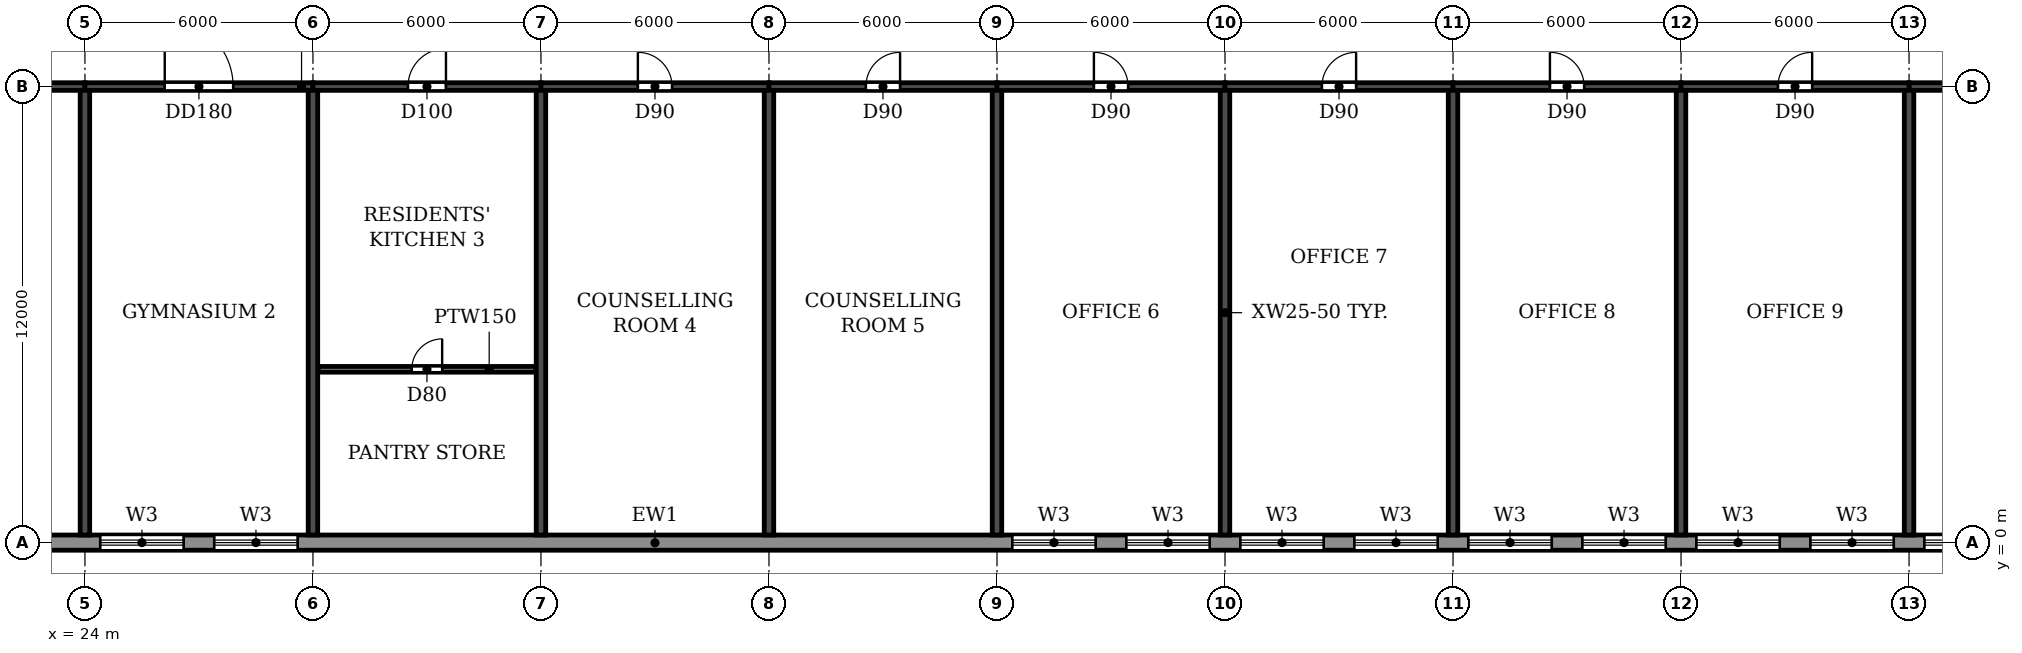
"""IFC4 building model, lengths in metres.
Left out: names, types, materials, properties, quantities, classifications, styles, units other than length and angle.
Written with IfcOpenShell. Run it as: python <this file> out.ifc"""

import sys

from ifc_helpers import new_model, si_unit, direction, frame, frame_2d, origin, place, context, subcontext, project, spatial, rectangle, extrude, element, fill, save


model = new_model("IFC4")
c1 = context("Model", 3, precision=1e-05, world=origin(), true_north=direction((0.0, 1.0)))
c2 = subcontext(c1, "Body", "Model", "MODEL_VIEW")
j1 = project(units=[si_unit("LENGTHUNIT", "METRE"), si_unit("PLANEANGLEUNIT", "RADIAN")], contexts=[c1])
p1 = place(None, origin())
s1 = spatial("IfcSite", under=j1, at=p1, CompositionType="ELEMENT")
p2 = place(p1, origin())
s2 = spatial("IfcBuilding", under=s1, at=p2, CompositionType="ELEMENT")
p3 = place(p2, frame((0.0, 0.0, 261.0)))
s3 = spatial("IfcBuildingStorey", under=s2, at=p3, CompositionType="ELEMENT", Elevation=261.0)
for number, where, z_axis, x_axis in (
    (1, (24.0, 0.2, 0.0), (0.0, 0.0, 1.0), (0.0, 1.0, 0.0)),
    (2, (30.0, 0.2, 0.0), (0.0, 0.0, 1.0), (0.0, 1.0, 0.0)),
    (3, (36.0, 0.2, 0.0), (0.0, 0.0, 1.0), (0.0, 1.0, 0.0)),
    (4, (42.0, 0.2, 0.0), (0.0, 0.0, 1.0), (0.0, 1.0, 0.0)),
    (5, (48.0, 0.2, 0.0), (0.0, 0.0, 1.0), (0.0, 1.0, 0.0)),
    (6, (54.0, 0.2, 0.0), (0.0, 0.0, 1.0), (0.0, 1.0, 0.0)),
    (7, (60.0, 0.2, 0.0), (0.0, 0.0, 1.0), (0.0, 1.0, 0.0)),
    (8, (66.0, 0.2, 0.0), (0.0, 0.0, 1.0), (0.0, 1.0, 0.0)),
    (9, (72.0, 0.2, 0.0), (0.0, 0.0, 1.0), (0.0, 1.0, 0.0)),
):
    element("IfcWall", number, at=place(p3, frame(where, z_axis=z_axis, x_axis=x_axis)), inside=s3, PredefinedType="SHEAR", context=c2, shape_type="SweptSolid", body=[
        extrude(rectangle(XDim=11.7, YDim=0.25, at=frame_2d((5.85, 0.0))), origin(), (0.0, 0.0, 1.0), 5.7),
    ])
p4 = place(p3, frame((18.2, 12.0, 0.0), z_axis=(0.0, 0.0, 1.0), x_axis=(1.0, 0.0, 0.0)))
e10 = element("IfcWall", 10, at=p4, inside=s3, PredefinedType="SHEAR", context=c2, shape_type="SweptSolid", body=[
    extrude(rectangle(XDim=5.8, YDim=0.2, at=frame_2d((2.9, 0.0))), origin(), (0.0, 0.0, 1.0), 5.1),
])
p5 = place(p4, frame((1.9, 0.0, 0.0)))
e11 = element("IfcOpeningElement", 11, at=p5, cuts=e10, PredefinedType="OPENING", context=c2, shape_type="SweptSolid", body=[
    extrude(rectangle(XDim=1.8, YDim=2.1, at=frame_2d((0.9, 1.05))), frame((0.0, 0.11, 0.0), z_axis=(0.0, -1.0, 0.0), x_axis=(1.0, 0.0, 0.0)), (0.0, 0.0, 1.0), 0.22),
])
p6 = place(p3, frame((24.0, 12.0, 0.0), z_axis=(0.0, 0.0, 1.0), x_axis=(1.0, 0.0, 0.0)))
e12 = element("IfcWall", 12, at=p6, inside=s3, PredefinedType="SHEAR", context=c2, shape_type="SweptSolid", body=[
    extrude(rectangle(XDim=6.0, YDim=0.2, at=frame_2d((3.0, 0.0))), origin(), (0.0, 0.0, 1.0), 5.1),
])
p7 = place(p6, frame((2.1, 0.0, 0.0)))
e13 = element("IfcOpeningElement", 13, at=p7, cuts=e12, PredefinedType="OPENING", context=c2, shape_type="SweptSolid", body=[
    extrude(rectangle(XDim=1.8, YDim=2.1, at=frame_2d((0.9, 1.05))), frame((0.0, 0.11, 0.0), z_axis=(0.0, -1.0, 0.0), x_axis=(1.0, 0.0, 0.0)), (0.0, 0.0, 1.0), 0.22),
])
p8 = place(p3, frame((30.0, 12.0, 0.0), z_axis=(0.0, 0.0, 1.0), x_axis=(1.0, 0.0, 0.0)))
e14 = element("IfcWall", 14, at=p8, inside=s3, PredefinedType="SHEAR", context=c2, shape_type="SweptSolid", body=[
    extrude(rectangle(XDim=6.0, YDim=0.2, at=frame_2d((3.0, 0.0))), origin(), (0.0, 0.0, 1.0), 5.1),
])
p9 = place(p8, frame((2.5, 0.0, 0.0)))
e15 = element("IfcOpeningElement", 15, at=p9, cuts=e14, PredefinedType="OPENING", context=c2, shape_type="SweptSolid", body=[
    extrude(rectangle(XDim=1.0, YDim=2.1, at=frame_2d((0.5, 1.05))), frame((0.0, 0.11, 0.0), z_axis=(0.0, -1.0, 0.0), x_axis=(1.0, 0.0, 0.0)), (0.0, 0.0, 1.0), 0.22),
])
p10 = place(p3, frame((36.0, 12.0, 0.0), z_axis=(0.0, 0.0, 1.0), x_axis=(1.0, 0.0, 0.0)))
e16 = element("IfcWall", 16, at=p10, inside=s3, PredefinedType="SHEAR", context=c2, shape_type="SweptSolid", body=[
    extrude(rectangle(XDim=6.0, YDim=0.2, at=frame_2d((3.0, 0.0))), origin(), (0.0, 0.0, 1.0), 5.1),
])
p11 = place(p10, frame((2.55, 0.0, 0.0)))
e17 = element("IfcOpeningElement", 17, at=p11, cuts=e16, PredefinedType="OPENING", context=c2, shape_type="SweptSolid", body=[
    extrude(rectangle(XDim=0.9, YDim=2.1, at=frame_2d((0.45, 1.05))), frame((0.0, 0.11, 0.0), z_axis=(0.0, -1.0, 0.0), x_axis=(1.0, 0.0, 0.0)), (0.0, 0.0, 1.0), 0.22),
])
p12 = place(p3, frame((42.0, 12.0, 0.0), z_axis=(0.0, 0.0, 1.0), x_axis=(1.0, 0.0, 0.0)))
e18 = element("IfcWall", 18, at=p12, inside=s3, PredefinedType="SHEAR", context=c2, shape_type="SweptSolid", body=[
    extrude(rectangle(XDim=6.0, YDim=0.2, at=frame_2d((3.0, 0.0))), origin(), (0.0, 0.0, 1.0), 5.1),
])
p13 = place(p12, frame((2.55, 0.0, 0.0)))
e19 = element("IfcOpeningElement", 19, at=p13, cuts=e18, PredefinedType="OPENING", context=c2, shape_type="SweptSolid", body=[
    extrude(rectangle(XDim=0.9, YDim=2.1, at=frame_2d((0.45, 1.05))), frame((0.0, 0.11, 0.0), z_axis=(0.0, -1.0, 0.0), x_axis=(1.0, 0.0, 0.0)), (0.0, 0.0, 1.0), 0.22),
])
p14 = place(p3, frame((48.0, 12.0, 0.0), z_axis=(0.0, 0.0, 1.0), x_axis=(1.0, 0.0, 0.0)))
e20 = element("IfcWall", 20, at=p14, inside=s3, PredefinedType="SHEAR", context=c2, shape_type="SweptSolid", body=[
    extrude(rectangle(XDim=6.0, YDim=0.2, at=frame_2d((3.0, 0.0))), origin(), (0.0, 0.0, 1.0), 5.1),
])
p15 = place(p14, frame((2.55, 0.0, 0.0)))
e21 = element("IfcOpeningElement", 21, at=p15, cuts=e20, PredefinedType="OPENING", context=c2, shape_type="SweptSolid", body=[
    extrude(rectangle(XDim=0.9, YDim=2.1, at=frame_2d((0.45, 1.05))), frame((0.0, 0.11, 0.0), z_axis=(0.0, -1.0, 0.0), x_axis=(1.0, 0.0, 0.0)), (0.0, 0.0, 1.0), 0.22),
])
p16 = place(p3, frame((54.0, 12.0, 0.0), z_axis=(0.0, 0.0, 1.0), x_axis=(1.0, 0.0, 0.0)))
e22 = element("IfcWall", 22, at=p16, inside=s3, PredefinedType="SHEAR", context=c2, shape_type="SweptSolid", body=[
    extrude(rectangle(XDim=6.0, YDim=0.2, at=frame_2d((3.0, 0.0))), origin(), (0.0, 0.0, 1.0), 5.1),
])
p17 = place(p16, frame((2.55, 0.0, 0.0)))
e23 = element("IfcOpeningElement", 23, at=p17, cuts=e22, PredefinedType="OPENING", context=c2, shape_type="SweptSolid", body=[
    extrude(rectangle(XDim=0.9, YDim=2.1, at=frame_2d((0.45, 1.05))), frame((0.0, 0.11, 0.0), z_axis=(0.0, -1.0, 0.0), x_axis=(1.0, 0.0, 0.0)), (0.0, 0.0, 1.0), 0.22),
])
p18 = place(p3, frame((60.0, 12.0, 0.0), z_axis=(0.0, 0.0, 1.0), x_axis=(1.0, 0.0, 0.0)))
e24 = element("IfcWall", 24, at=p18, inside=s3, PredefinedType="SHEAR", context=c2, shape_type="SweptSolid", body=[
    extrude(rectangle(XDim=6.0, YDim=0.2, at=frame_2d((3.0, 0.0))), origin(), (0.0, 0.0, 1.0), 5.1),
])
p19 = place(p18, frame((2.55, 0.0, 0.0)))
e25 = element("IfcOpeningElement", 25, at=p19, cuts=e24, PredefinedType="OPENING", context=c2, shape_type="SweptSolid", body=[
    extrude(rectangle(XDim=0.9, YDim=2.1, at=frame_2d((0.45, 1.05))), frame((0.0, 0.11, 0.0), z_axis=(0.0, -1.0, 0.0), x_axis=(1.0, 0.0, 0.0)), (0.0, 0.0, 1.0), 0.22),
])
p20 = place(p3, frame((66.0, 12.0, 0.0), z_axis=(0.0, 0.0, 1.0), x_axis=(1.0, 0.0, 0.0)))
e26 = element("IfcWall", 26, at=p20, inside=s3, PredefinedType="SHEAR", context=c2, shape_type="SweptSolid", body=[
    extrude(rectangle(XDim=6.0, YDim=0.2, at=frame_2d((3.0, 0.0))), origin(), (0.0, 0.0, 1.0), 5.1),
])
p21 = place(p20, frame((2.55, 0.0, 0.0)))
e27 = element("IfcOpeningElement", 27, at=p21, cuts=e26, PredefinedType="OPENING", context=c2, shape_type="SweptSolid", body=[
    extrude(rectangle(XDim=0.9, YDim=2.1, at=frame_2d((0.45, 1.05))), frame((0.0, 0.11, 0.0), z_axis=(0.0, -1.0, 0.0), x_axis=(1.0, 0.0, 0.0)), (0.0, 0.0, 1.0), 0.22),
])
p22 = place(p3, frame((72.0, 12.0, 0.0), z_axis=(0.0, 0.0, 1.0), x_axis=(1.0, 0.0, 0.0)))
e28 = element("IfcWall", 28, at=p22, inside=s3, PredefinedType="SHEAR", context=c2, shape_type="SweptSolid", body=[
    extrude(rectangle(XDim=6.0, YDim=0.2, at=frame_2d((3.0, 0.0))), origin(), (0.0, 0.0, 1.0), 5.1),
])
p23 = place(p22, frame((2.55, 0.0, 0.0)))
e29 = element("IfcOpeningElement", 29, at=p23, cuts=e28, PredefinedType="OPENING", context=c2, shape_type="SweptSolid", body=[
    extrude(rectangle(XDim=0.9, YDim=2.1, at=frame_2d((0.45, 1.05))), frame((0.0, 0.11, 0.0), z_axis=(0.0, -1.0, 0.0), x_axis=(1.0, 0.0, 0.0)), (0.0, 0.0, 1.0), 0.22),
])
p24 = place(p3, frame((22.683, 0.0, 0.0), z_axis=(0.0, 0.0, 1.0), x_axis=(1.0, 0.0, 0.0)))
e30 = element("IfcWall", 30, at=p24, inside=s3, PredefinedType="STANDARD", context=c2, shape_type="SweptSolid", body=[
    extrude(rectangle(XDim=56.634, YDim=0.4, at=frame_2d((28.317, 0.0))), origin(), (0.0, 0.0, 1.0), 5.7),
])
p25 = place(p24, frame((1.717, 0.0, 0.6)))
e31 = element("IfcOpeningElement", 31, at=p25, cuts=e30, PredefinedType="OPENING", context=c2, shape_type="SweptSolid", body=[
    extrude(rectangle(XDim=2.2, YDim=1.8, at=frame_2d((1.1, 0.9))), frame((0.0, 0.21, 0.0), z_axis=(0.0, -1.0, 0.0), x_axis=(1.0, 0.0, 0.0)), (0.0, 0.0, 1.0), 0.42),
])
p26 = place(p24, frame((4.717, 0.0, 0.6)))
e32 = element("IfcOpeningElement", 32, at=p26, cuts=e30, PredefinedType="OPENING", context=c2, shape_type="SweptSolid", body=[
    extrude(rectangle(XDim=2.2, YDim=1.8, at=frame_2d((1.1, 0.9))), frame((0.0, 0.21, 0.0), z_axis=(0.0, -1.0, 0.0), x_axis=(1.0, 0.0, 0.0)), (0.0, 0.0, 1.0), 0.42),
])
p27 = place(p24, frame((25.717, 0.0, 0.6)))
e33 = element("IfcOpeningElement", 33, at=p27, cuts=e30, PredefinedType="OPENING", context=c2, shape_type="SweptSolid", body=[
    extrude(rectangle(XDim=2.2, YDim=1.8, at=frame_2d((1.1, 0.9))), frame((0.0, 0.21, 0.0), z_axis=(0.0, -1.0, 0.0), x_axis=(1.0, 0.0, 0.0)), (0.0, 0.0, 1.0), 0.42),
])
p28 = place(p24, frame((28.717, 0.0, 0.6)))
e34 = element("IfcOpeningElement", 34, at=p28, cuts=e30, PredefinedType="OPENING", context=c2, shape_type="SweptSolid", body=[
    extrude(rectangle(XDim=2.2, YDim=1.8, at=frame_2d((1.1, 0.9))), frame((0.0, 0.21, 0.0), z_axis=(0.0, -1.0, 0.0), x_axis=(1.0, 0.0, 0.0)), (0.0, 0.0, 1.0), 0.42),
])
p29 = place(p24, frame((31.717, 0.0, 0.6)))
e35 = element("IfcOpeningElement", 35, at=p29, cuts=e30, PredefinedType="OPENING", context=c2, shape_type="SweptSolid", body=[
    extrude(rectangle(XDim=2.2, YDim=1.8, at=frame_2d((1.1, 0.9))), frame((0.0, 0.21, 0.0), z_axis=(0.0, -1.0, 0.0), x_axis=(1.0, 0.0, 0.0)), (0.0, 0.0, 1.0), 0.42),
])
p30 = place(p24, frame((34.717, 0.0, 0.6)))
e36 = element("IfcOpeningElement", 36, at=p30, cuts=e30, PredefinedType="OPENING", context=c2, shape_type="SweptSolid", body=[
    extrude(rectangle(XDim=2.2, YDim=1.8, at=frame_2d((1.1, 0.9))), frame((0.0, 0.21, 0.0), z_axis=(0.0, -1.0, 0.0), x_axis=(1.0, 0.0, 0.0)), (0.0, 0.0, 1.0), 0.42),
])
p31 = place(p24, frame((37.717, 0.0, 0.6)))
e37 = element("IfcOpeningElement", 37, at=p31, cuts=e30, PredefinedType="OPENING", context=c2, shape_type="SweptSolid", body=[
    extrude(rectangle(XDim=2.2, YDim=1.8, at=frame_2d((1.1, 0.9))), frame((0.0, 0.21, 0.0), z_axis=(0.0, -1.0, 0.0), x_axis=(1.0, 0.0, 0.0)), (0.0, 0.0, 1.0), 0.42),
])
p32 = place(p24, frame((40.717, 0.0, 0.6)))
e38 = element("IfcOpeningElement", 38, at=p32, cuts=e30, PredefinedType="OPENING", context=c2, shape_type="SweptSolid", body=[
    extrude(rectangle(XDim=2.2, YDim=1.8, at=frame_2d((1.1, 0.9))), frame((0.0, 0.21, 0.0), z_axis=(0.0, -1.0, 0.0), x_axis=(1.0, 0.0, 0.0)), (0.0, 0.0, 1.0), 0.42),
])
p33 = place(p24, frame((43.717, 0.0, 0.6)))
e39 = element("IfcOpeningElement", 39, at=p33, cuts=e30, PredefinedType="OPENING", context=c2, shape_type="SweptSolid", body=[
    extrude(rectangle(XDim=2.2, YDim=1.8, at=frame_2d((1.1, 0.9))), frame((0.0, 0.21, 0.0), z_axis=(0.0, -1.0, 0.0), x_axis=(1.0, 0.0, 0.0)), (0.0, 0.0, 1.0), 0.42),
])
p34 = place(p24, frame((46.717, 0.0, 0.6)))
e40 = element("IfcOpeningElement", 40, at=p34, cuts=e30, PredefinedType="OPENING", context=c2, shape_type="SweptSolid", body=[
    extrude(rectangle(XDim=2.2, YDim=1.8, at=frame_2d((1.1, 0.9))), frame((0.0, 0.21, 0.0), z_axis=(0.0, -1.0, 0.0), x_axis=(1.0, 0.0, 0.0)), (0.0, 0.0, 1.0), 0.42),
])
p35 = place(p24, frame((49.717, 0.0, 0.6)))
e41 = element("IfcOpeningElement", 41, at=p35, cuts=e30, PredefinedType="OPENING", context=c2, shape_type="SweptSolid", body=[
    extrude(rectangle(XDim=2.2, YDim=1.8, at=frame_2d((1.1, 0.9))), frame((0.0, 0.21, 0.0), z_axis=(0.0, -1.0, 0.0), x_axis=(1.0, 0.0, 0.0)), (0.0, 0.0, 1.0), 0.42),
])
p36 = place(p24, frame((52.717, 0.0, 0.6)))
e42 = element("IfcOpeningElement", 42, at=p36, cuts=e30, PredefinedType="OPENING", context=c2, shape_type="SweptSolid", body=[
    extrude(rectangle(XDim=2.2, YDim=1.8, at=frame_2d((1.1, 0.9))), frame((0.0, 0.21, 0.0), z_axis=(0.0, -1.0, 0.0), x_axis=(1.0, 0.0, 0.0)), (0.0, 0.0, 1.0), 0.42),
])
p37 = place(p3, frame((30.135, 4.56, 0.0), z_axis=(0.0, 0.0, 1.0), x_axis=(1.0, 0.0, 0.0)))
e43 = element("IfcWall", 43, at=p37, inside=s3, PredefinedType="PARTITIONING", context=c2, shape_type="SweptSolid", body=[
    extrude(rectangle(XDim=5.73, YDim=0.15, at=frame_2d((2.865, 0.0))), origin(), (0.0, 0.0, 1.0), 5.7),
])
p38 = place(p37, frame((2.465, 0.0, 0.0)))
e44 = element("IfcOpeningElement", 44, at=p38, cuts=e43, PredefinedType="OPENING", context=c2, shape_type="SweptSolid", body=[
    extrude(rectangle(XDim=0.8, YDim=2.1, at=frame_2d((0.4, 1.05))), frame((0.0, 0.085, 0.0), z_axis=(0.0, -1.0, 0.0), x_axis=(1.0, 0.0, 0.0)), (0.0, 0.0, 1.0), 0.17),
])
p39 = place(p25, origin())
e45 = element("IfcWindow", 45, at=p39, inside=s3, PartitioningType="DOUBLE_PANEL_HORIZONTAL", PredefinedType="WINDOW", context=c2, shape_type="SweptSolid", body=[
    extrude(rectangle(XDim=2.2, YDim=1.8, at=frame_2d((1.1, 0.9))), frame((0.0, 0.03, 0.0), z_axis=(0.0, -1.0, 0.0), x_axis=(1.0, 0.0, 0.0)), (0.0, 0.0, 1.0), 0.06),
])
fill(e31, e45)
p40 = place(p26, origin())
e46 = element("IfcWindow", 46, at=p40, inside=s3, PartitioningType="DOUBLE_PANEL_HORIZONTAL", PredefinedType="WINDOW", context=c2, shape_type="SweptSolid", body=[
    extrude(rectangle(XDim=2.2, YDim=1.8, at=frame_2d((1.1, 0.9))), frame((0.0, 0.03, 0.0), z_axis=(0.0, -1.0, 0.0), x_axis=(1.0, 0.0, 0.0)), (0.0, 0.0, 1.0), 0.06),
])
fill(e32, e46)
p41 = place(p27, origin())
e47 = element("IfcWindow", 47, at=p41, inside=s3, PartitioningType="DOUBLE_PANEL_HORIZONTAL", PredefinedType="WINDOW", context=c2, shape_type="SweptSolid", body=[
    extrude(rectangle(XDim=2.2, YDim=1.8, at=frame_2d((1.1, 0.9))), frame((0.0, 0.03, 0.0), z_axis=(0.0, -1.0, 0.0), x_axis=(1.0, 0.0, 0.0)), (0.0, 0.0, 1.0), 0.06),
])
fill(e33, e47)
p42 = place(p28, origin())
e48 = element("IfcWindow", 48, at=p42, inside=s3, PartitioningType="DOUBLE_PANEL_HORIZONTAL", PredefinedType="WINDOW", context=c2, shape_type="SweptSolid", body=[
    extrude(rectangle(XDim=2.2, YDim=1.8, at=frame_2d((1.1, 0.9))), frame((0.0, 0.03, 0.0), z_axis=(0.0, -1.0, 0.0), x_axis=(1.0, 0.0, 0.0)), (0.0, 0.0, 1.0), 0.06),
])
fill(e34, e48)
p43 = place(p29, origin())
e49 = element("IfcWindow", 49, at=p43, inside=s3, PartitioningType="DOUBLE_PANEL_HORIZONTAL", PredefinedType="WINDOW", context=c2, shape_type="SweptSolid", body=[
    extrude(rectangle(XDim=2.2, YDim=1.8, at=frame_2d((1.1, 0.9))), frame((0.0, 0.03, 0.0), z_axis=(0.0, -1.0, 0.0), x_axis=(1.0, 0.0, 0.0)), (0.0, 0.0, 1.0), 0.06),
])
fill(e35, e49)
p44 = place(p30, origin())
e50 = element("IfcWindow", 50, at=p44, inside=s3, PartitioningType="DOUBLE_PANEL_HORIZONTAL", PredefinedType="WINDOW", context=c2, shape_type="SweptSolid", body=[
    extrude(rectangle(XDim=2.2, YDim=1.8, at=frame_2d((1.1, 0.9))), frame((0.0, 0.03, 0.0), z_axis=(0.0, -1.0, 0.0), x_axis=(1.0, 0.0, 0.0)), (0.0, 0.0, 1.0), 0.06),
])
fill(e36, e50)
p45 = place(p31, origin())
e51 = element("IfcWindow", 51, at=p45, inside=s3, PartitioningType="DOUBLE_PANEL_HORIZONTAL", PredefinedType="WINDOW", context=c2, shape_type="SweptSolid", body=[
    extrude(rectangle(XDim=2.2, YDim=1.8, at=frame_2d((1.1, 0.9))), frame((0.0, 0.03, 0.0), z_axis=(0.0, -1.0, 0.0), x_axis=(1.0, 0.0, 0.0)), (0.0, 0.0, 1.0), 0.06),
])
fill(e37, e51)
p46 = place(p32, origin())
e52 = element("IfcWindow", 52, at=p46, inside=s3, PartitioningType="DOUBLE_PANEL_HORIZONTAL", PredefinedType="WINDOW", context=c2, shape_type="SweptSolid", body=[
    extrude(rectangle(XDim=2.2, YDim=1.8, at=frame_2d((1.1, 0.9))), frame((0.0, 0.03, 0.0), z_axis=(0.0, -1.0, 0.0), x_axis=(1.0, 0.0, 0.0)), (0.0, 0.0, 1.0), 0.06),
])
fill(e38, e52)
p47 = place(p33, origin())
e53 = element("IfcWindow", 53, at=p47, inside=s3, PartitioningType="DOUBLE_PANEL_HORIZONTAL", PredefinedType="WINDOW", context=c2, shape_type="SweptSolid", body=[
    extrude(rectangle(XDim=2.2, YDim=1.8, at=frame_2d((1.1, 0.9))), frame((0.0, 0.03, 0.0), z_axis=(0.0, -1.0, 0.0), x_axis=(1.0, 0.0, 0.0)), (0.0, 0.0, 1.0), 0.06),
])
fill(e39, e53)
p48 = place(p34, origin())
e54 = element("IfcWindow", 54, at=p48, inside=s3, PartitioningType="DOUBLE_PANEL_HORIZONTAL", PredefinedType="WINDOW", context=c2, shape_type="SweptSolid", body=[
    extrude(rectangle(XDim=2.2, YDim=1.8, at=frame_2d((1.1, 0.9))), frame((0.0, 0.03, 0.0), z_axis=(0.0, -1.0, 0.0), x_axis=(1.0, 0.0, 0.0)), (0.0, 0.0, 1.0), 0.06),
])
fill(e40, e54)
p49 = place(p35, origin())
e55 = element("IfcWindow", 55, at=p49, inside=s3, PartitioningType="DOUBLE_PANEL_HORIZONTAL", PredefinedType="WINDOW", context=c2, shape_type="SweptSolid", body=[
    extrude(rectangle(XDim=2.2, YDim=1.8, at=frame_2d((1.1, 0.9))), frame((0.0, 0.03, 0.0), z_axis=(0.0, -1.0, 0.0), x_axis=(1.0, 0.0, 0.0)), (0.0, 0.0, 1.0), 0.06),
])
fill(e41, e55)
p50 = place(p7, origin())
e56 = element("IfcDoor", 56, at=p50, inside=s3, OperationType="DOUBLE_DOOR_SINGLE_SWING", PredefinedType="DOOR", context=c2, shape_type="SweptSolid", body=[
    extrude(rectangle(XDim=1.8, YDim=2.1, at=frame_2d((0.9, 1.05))), frame((0.0, 0.025, 0.0), z_axis=(0.0, -1.0, 0.0), x_axis=(1.0, 0.0, 0.0)), (0.0, 0.0, 1.0), 0.05),
])
fill(e13, e56)
p51 = place(p9, origin())
e57 = element("IfcDoor", 57, at=p51, inside=s3, OperationType="SINGLE_SWING_RIGHT", PredefinedType="DOOR", context=c2, shape_type="SweptSolid", body=[
    extrude(rectangle(XDim=1.0, YDim=2.1, at=frame_2d((0.5, 1.05))), frame((0.0, 0.025, 0.0), z_axis=(0.0, -1.0, 0.0), x_axis=(1.0, 0.0, 0.0)), (0.0, 0.0, 1.0), 0.05),
])
fill(e15, e57)
p52 = place(p11, origin())
e58 = element("IfcDoor", 58, at=p52, inside=s3, OperationType="SINGLE_SWING_LEFT", PredefinedType="DOOR", context=c2, shape_type="SweptSolid", body=[
    extrude(rectangle(XDim=0.9, YDim=2.1, at=frame_2d((0.45, 1.05))), frame((0.0, 0.025, 0.0), z_axis=(0.0, -1.0, 0.0), x_axis=(1.0, 0.0, 0.0)), (0.0, 0.0, 1.0), 0.05),
])
fill(e17, e58)
p53 = place(p13, origin())
e59 = element("IfcDoor", 59, at=p53, inside=s3, OperationType="SINGLE_SWING_RIGHT", PredefinedType="DOOR", context=c2, shape_type="SweptSolid", body=[
    extrude(rectangle(XDim=0.9, YDim=2.1, at=frame_2d((0.45, 1.05))), frame((0.0, 0.025, 0.0), z_axis=(0.0, -1.0, 0.0), x_axis=(1.0, 0.0, 0.0)), (0.0, 0.0, 1.0), 0.05),
])
fill(e19, e59)
p54 = place(p15, origin())
e60 = element("IfcDoor", 60, at=p54, inside=s3, OperationType="SINGLE_SWING_LEFT", PredefinedType="DOOR", context=c2, shape_type="SweptSolid", body=[
    extrude(rectangle(XDim=0.9, YDim=2.1, at=frame_2d((0.45, 1.05))), frame((0.0, 0.025, 0.0), z_axis=(0.0, -1.0, 0.0), x_axis=(1.0, 0.0, 0.0)), (0.0, 0.0, 1.0), 0.05),
])
fill(e21, e60)
p55 = place(p17, origin())
e61 = element("IfcDoor", 61, at=p55, inside=s3, OperationType="SINGLE_SWING_RIGHT", PredefinedType="DOOR", context=c2, shape_type="SweptSolid", body=[
    extrude(rectangle(XDim=0.9, YDim=2.1, at=frame_2d((0.45, 1.05))), frame((0.0, 0.025, 0.0), z_axis=(0.0, -1.0, 0.0), x_axis=(1.0, 0.0, 0.0)), (0.0, 0.0, 1.0), 0.05),
])
fill(e23, e61)
p56 = place(p19, origin())
e62 = element("IfcDoor", 62, at=p56, inside=s3, OperationType="SINGLE_SWING_LEFT", PredefinedType="DOOR", context=c2, shape_type="SweptSolid", body=[
    extrude(rectangle(XDim=0.9, YDim=2.1, at=frame_2d((0.45, 1.05))), frame((0.0, 0.025, 0.0), z_axis=(0.0, -1.0, 0.0), x_axis=(1.0, 0.0, 0.0)), (0.0, 0.0, 1.0), 0.05),
])
fill(e25, e62)
p57 = place(p21, origin())
e63 = element("IfcDoor", 63, at=p57, inside=s3, OperationType="SINGLE_SWING_RIGHT", PredefinedType="DOOR", context=c2, shape_type="SweptSolid", body=[
    extrude(rectangle(XDim=0.9, YDim=2.1, at=frame_2d((0.45, 1.05))), frame((0.0, 0.025, 0.0), z_axis=(0.0, -1.0, 0.0), x_axis=(1.0, 0.0, 0.0)), (0.0, 0.0, 1.0), 0.05),
])
fill(e27, e63)
p58 = place(p38, origin())
e64 = element("IfcDoor", 64, at=p58, inside=s3, OperationType="SINGLE_SWING_RIGHT", PredefinedType="DOOR", context=c2, shape_type="SweptSolid", body=[
    extrude(rectangle(XDim=0.8, YDim=2.1, at=frame_2d((0.4, 1.05))), frame((0.0, 0.025, 0.0), z_axis=(0.0, -1.0, 0.0), x_axis=(1.0, 0.0, 0.0)), (0.0, 0.0, 1.0), 0.05),
])
fill(e44, e64)
save(model, sys.argv[1])
